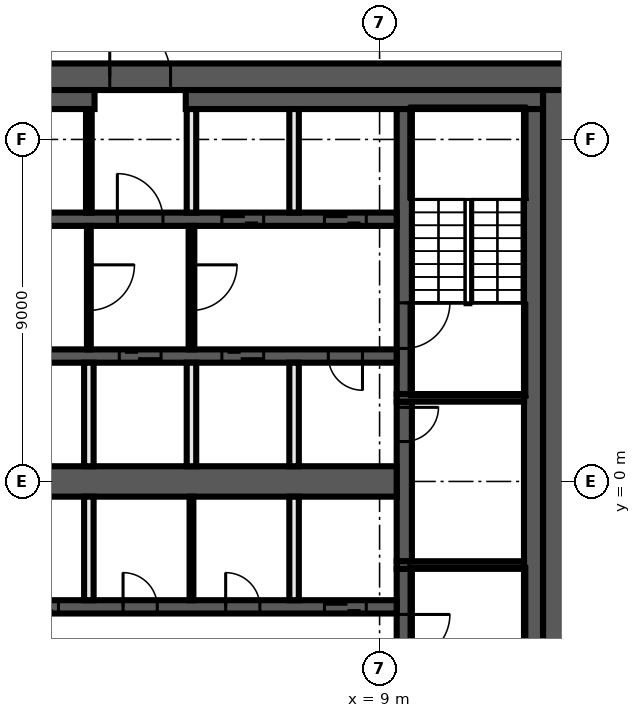
"""IFC4 building model, lengths in metres.
Left out: names, types, materials, properties, quantities, classifications, styles, units other than length and angle.
Written with IfcOpenShell. Run it as: python <this file> out.ifc"""

import sys

from ifc_helpers import new_model, si_unit, direction, frame, frame_2d, origin, place, context, subcontext, project, spatial, rectangle, extrude, element, fill, save


model = new_model("IFC4")
c1 = context("Model", 3, precision=1e-05, world=origin(), true_north=direction((0.0, 1.0)))
c2 = subcontext(c1, "Body", "Model", "MODEL_VIEW")
j1 = project(units=[si_unit("LENGTHUNIT", "METRE"), si_unit("PLANEANGLEUNIT", "RADIAN")], contexts=[c1])
p1 = place(None, origin())
s1 = spatial("IfcSite", under=j1, at=p1, CompositionType="ELEMENT")
p2 = place(p1, origin())
s2 = spatial("IfcBuilding", under=s1, at=p2, CompositionType="ELEMENT")
p3 = place(p2, frame((0.0, 0.0, 283.2)))
s3 = spatial("IfcBuildingStorey", under=s2, at=p3, CompositionType="ELEMENT", Elevation=283.2)
p4 = place(p3, frame((26.921, 9.18, 0.0), z_axis=(0.0, 0.0, 1.0), x_axis=(-0.666670693315, 0.745352390936, 0.0)))
e1 = element("IfcWall", 1, at=p4, inside=s3, PredefinedType="SOLIDWALL", context=c2, shape_type="SweptSolid", body=[
    extrude(rectangle(XDim=20.06, YDim=0.25, at=frame_2d((10.03, 0.0))), origin(), (0.0, 0.0, 1.0), 5.55),
])
p5 = place(p3, frame((-14.0, 10.65, 0.0), z_axis=(0.0, 0.0, 1.0), x_axis=(1.0, 0.0, 0.0)))
e2 = element("IfcWall", 2, at=p5, inside=s3, PredefinedType="SHEAR", context=c2, shape_type="SweptSolid", body=[
    extrude(rectangle(XDim=28.0, YDim=0.7, at=frame_2d((14.0, 0.0))), origin(), (0.0, 0.0, 1.0), 5.55),
])
p6 = place(p5, frame((15.9, 0.0, 0.0)))
e3 = element("IfcOpeningElement", 3, at=p6, cuts=e2, PredefinedType="OPENING", context=c2, shape_type="SweptSolid", body=[
    extrude(rectangle(XDim=1.6, YDim=2.1, at=frame_2d((0.8, 1.05))), frame((0.0, 0.36, 0.0), z_axis=(0.0, -1.0, 0.0), x_axis=(1.0, 0.0, 0.0)), (0.0, 0.0, 1.0), 0.72),
])
p7 = place(p3, frame((13.65, 10.3, 0.0), z_axis=(0.0, 0.0, 1.0), x_axis=(0.0, -1.0, 0.0)))
e4 = element("IfcWall", 4, at=p7, inside=s3, PredefinedType="SHEAR", context=c2, shape_type="SweptSolid", body=[
    extrude(rectangle(XDim=20.6, YDim=0.7, at=frame_2d((10.3, 0.0))), origin(), (0.0, 0.0, 1.0), 5.55),
])
p8 = place(p3, frame((-13.3, 10.05, 0.0), z_axis=(0.0, 0.0, 1.0), x_axis=(1.0, 0.0, 0.0)))
e5 = element("IfcWall", 5, at=p8, inside=s3, PredefinedType="SHEAR", context=c2, shape_type="SweptSolid", body=[
    extrude(rectangle(XDim=14.8, YDim=0.5, at=frame_2d((7.4, 0.0))), origin(), (0.0, 0.0, 1.0), 5.55),
])
p9 = place(p3, frame((3.9, 10.05, 0.0), z_axis=(0.0, 0.0, 1.0), x_axis=(1.0, 0.0, 0.0)))
e6 = element("IfcWall", 6, at=p9, inside=s3, PredefinedType="SHEAR", context=c2, shape_type="SweptSolid", body=[
    extrude(rectangle(XDim=9.4, YDim=0.5, at=frame_2d((4.7, 0.0))), origin(), (0.0, 0.0, 1.0), 5.55),
])
p10 = place(p3, frame((13.05, 9.8, 0.0), z_axis=(0.0, 0.0, 1.0), x_axis=(0.0, -1.0, 0.0)))
e7 = element("IfcWall", 7, at=p10, inside=s3, PredefinedType="SHEAR", context=c2, shape_type="SweptSolid", body=[
    extrude(rectangle(XDim=19.6, YDim=0.5, at=frame_2d((9.8, 0.0))), origin(), (0.0, 0.0, 1.0), 5.55),
])
p11 = place(p3, frame((9.65, -2.3, 0.0), z_axis=(0.0, 0.0, 1.0), x_axis=(0.0, -1.0, 0.0)))
e8 = element("IfcWall", 8, at=p11, inside=s3, PredefinedType="SHEAR", context=c2, shape_type="SweptSolid", body=[
    extrude(rectangle(XDim=7.5, YDim=0.4, at=frame_2d((3.75, 0.0))), origin(), (0.0, 0.0, 1.0), 5.55),
])
p12 = place(p11, frame((1.2, 0.0, 0.0)))
e9 = element("IfcOpeningElement", 9, at=p12, cuts=e8, PredefinedType="OPENING", context=c2, shape_type="SweptSolid", body=[
    extrude(rectangle(XDim=1.2, YDim=2.1, at=frame_2d((0.6, 1.05))), frame((0.0, 0.21, 0.0), z_axis=(0.0, -1.0, 0.0), x_axis=(1.0, 0.0, 0.0)), (0.0, 0.0, 1.0), 0.42),
])
p13 = place(p3, frame((9.65, 2.1, 0.0), z_axis=(0.0, 0.0, 1.0), x_axis=(0.0, -1.0, 0.0)))
e10 = element("IfcWall", 10, at=p13, inside=s3, PredefinedType="SHEAR", context=c2, shape_type="SweptSolid", body=[
    extrude(rectangle(XDim=4.2, YDim=0.4, at=frame_2d((2.1, 0.0))), origin(), (0.0, 0.0, 1.0), 5.55),
])
p14 = place(p13, frame((0.15, 0.0, 0.0)))
e11 = element("IfcOpeningElement", 11, at=p14, cuts=e10, PredefinedType="OPENING", context=c2, shape_type="SweptSolid", body=[
    extrude(rectangle(XDim=0.9, YDim=2.1, at=frame_2d((0.45, 1.05))), frame((0.0, 0.21, 0.0), z_axis=(0.0, -1.0, 0.0), x_axis=(1.0, 0.0, 0.0)), (0.0, 0.0, 1.0), 0.42),
])
p15 = place(p3, frame((9.65, 9.8, 0.0), z_axis=(0.0, 0.0, 1.0), x_axis=(0.0, -1.0, 0.0)))
e12 = element("IfcWall", 12, at=p15, inside=s3, PredefinedType="SHEAR", context=c2, shape_type="SweptSolid", body=[
    extrude(rectangle(XDim=7.5, YDim=0.4, at=frame_2d((3.75, 0.0))), origin(), (0.0, 0.0, 1.0), 5.55),
])
p16 = place(p15, frame((5.1, 0.0, 0.0)))
e13 = element("IfcOpeningElement", 13, at=p16, cuts=e12, PredefinedType="OPENING", context=c2, shape_type="SweptSolid", body=[
    extrude(rectangle(XDim=1.2, YDim=2.1, at=frame_2d((0.6, 1.05))), frame((0.0, 0.21, 0.0), z_axis=(0.0, -1.0, 0.0), x_axis=(1.0, 0.0, 0.0)), (0.0, 0.0, 1.0), 0.42),
])
for number, where, z_axis, x_axis in (
    (14, (9.45, 2.2, 0.0), (0.0, 0.0, 1.0), (1.0, 0.0, 0.0)),
    (15, (9.45, -2.2, 0.0), (0.0, 0.0, 1.0), (1.0, 0.0, 0.0)),
):
    element("IfcWall", number, at=place(p3, frame(where, z_axis=z_axis, x_axis=x_axis)), inside=s3, PredefinedType="SHEAR", context=c2, shape_type="SweptSolid", body=[
        extrude(rectangle(XDim=3.35, YDim=0.2, at=frame_2d((1.675, 0.0))), origin(), (0.0, 0.0, 1.0), 5.55),
    ])
p17 = place(p3, frame((-9.45, 6.9, 0.0), z_axis=(0.0, 0.0, 1.0), x_axis=(1.0, 0.0, 0.0)))
e16 = element("IfcWall", 16, at=p17, inside=s3, PredefinedType="SHEAR", context=c2, shape_type="SweptSolid", body=[
    extrude(rectangle(XDim=18.9, YDim=0.35, at=frame_2d((9.45, 0.0))), origin(), (0.0, 0.0, 1.0), 5.55),
])
p18 = place(p17, frame((11.55, 0.0, 0.0)))
e17 = element("IfcOpeningElement", 17, at=p18, cuts=e16, PredefinedType="OPENING", context=c2, shape_type="SweptSolid", body=[
    extrude(rectangle(XDim=1.2, YDim=2.1, at=frame_2d((0.6, 1.05))), frame((0.0, 0.185, 0.0), z_axis=(0.0, -1.0, 0.0), x_axis=(1.0, 0.0, 0.0)), (0.0, 0.0, 1.0), 0.37),
])
p19 = place(p17, frame((14.3, 0.0, 0.0)))
e18 = element("IfcOpeningElement", 18, at=p19, cuts=e16, PredefinedType="OPENING", context=c2, shape_type="SweptSolid", body=[
    extrude(rectangle(XDim=1.1, YDim=2.1, at=frame_2d((0.55, 1.05))), frame((0.0, 0.185, 0.0), z_axis=(0.0, -1.0, 0.0), x_axis=(1.0, 0.0, 0.0)), (0.0, 0.0, 1.0), 0.37),
])
p20 = place(p17, frame((17.0, 0.0, 0.0)))
e19 = element("IfcOpeningElement", 19, at=p20, cuts=e16, PredefinedType="OPENING", context=c2, shape_type="SweptSolid", body=[
    extrude(rectangle(XDim=1.1, YDim=2.1, at=frame_2d((0.55, 1.05))), frame((0.0, 0.185, 0.0), z_axis=(0.0, -1.0, 0.0), x_axis=(1.0, 0.0, 0.0)), (0.0, 0.0, 1.0), 0.37),
])
p21 = place(p17, frame((2.25, 0.0, 0.0)))
e20 = element("IfcOpeningElement", 20, at=p21, cuts=e16, PredefinedType="OPENING", context=c2, shape_type="SweptSolid", body=[
    extrude(rectangle(XDim=0.9, YDim=2.1, at=frame_2d((0.45, 1.05))), frame((0.0, 0.185, 0.0), z_axis=(0.0, -1.0, 0.0), x_axis=(1.0, 0.0, 0.0)), (0.0, 0.0, 1.0), 0.37),
])
p22 = place(p17, frame((7.65, 0.0, 0.0)))
e21 = element("IfcOpeningElement", 21, at=p22, cuts=e16, PredefinedType="OPENING", context=c2, shape_type="SweptSolid", body=[
    extrude(rectangle(XDim=0.9, YDim=2.1, at=frame_2d((0.45, 1.05))), frame((0.0, 0.185, 0.0), z_axis=(0.0, -1.0, 0.0), x_axis=(1.0, 0.0, 0.0)), (0.0, 0.0, 1.0), 0.37),
])
p23 = place(p3, frame((9.45, 3.3, 0.0), z_axis=(0.0, 0.0, 1.0), x_axis=(-1.0, 0.0, 0.0)))
e22 = element("IfcWall", 22, at=p23, inside=s3, PredefinedType="SHEAR", context=c2, shape_type="SweptSolid", body=[
    extrude(rectangle(XDim=18.9, YDim=0.35, at=frame_2d((9.45, 0.0))), origin(), (0.0, 0.0, 1.0), 5.55),
])
p24 = place(p23, frame((6.2, 0.0, 0.0)))
e23 = element("IfcOpeningElement", 23, at=p24, cuts=e22, PredefinedType="OPENING", context=c2, shape_type="SweptSolid", body=[
    extrude(rectangle(XDim=1.1, YDim=2.1, at=frame_2d((0.55, 1.05))), frame((0.0, 0.185, 0.0), z_axis=(0.0, -1.0, 0.0), x_axis=(1.0, 0.0, 0.0)), (0.0, 0.0, 1.0), 0.37),
])
p25 = place(p23, frame((3.5, 0.0, 0.0)))
e24 = element("IfcOpeningElement", 24, at=p25, cuts=e22, PredefinedType="OPENING", context=c2, shape_type="SweptSolid", body=[
    extrude(rectangle(XDim=1.1, YDim=2.1, at=frame_2d((0.55, 1.05))), frame((0.0, 0.185, 0.0), z_axis=(0.0, -1.0, 0.0), x_axis=(1.0, 0.0, 0.0)), (0.0, 0.0, 1.0), 0.37),
])
p26 = place(p23, frame((0.9, 0.0, 0.0)))
e25 = element("IfcOpeningElement", 25, at=p26, cuts=e22, PredefinedType="OPENING", context=c2, shape_type="SweptSolid", body=[
    extrude(rectangle(XDim=0.9, YDim=2.1, at=frame_2d((0.45, 1.05))), frame((0.0, 0.185, 0.0), z_axis=(0.0, -1.0, 0.0), x_axis=(1.0, 0.0, 0.0)), (0.0, 0.0, 1.0), 0.37),
])
p27 = place(p23, frame((17.1, 0.0, 0.0)))
e26 = element("IfcOpeningElement", 26, at=p27, cuts=e22, PredefinedType="OPENING", context=c2, shape_type="SweptSolid", body=[
    extrude(rectangle(XDim=0.9, YDim=2.1, at=frame_2d((0.45, 1.05))), frame((0.0, 0.185, 0.0), z_axis=(0.0, -1.0, 0.0), x_axis=(1.0, 0.0, 0.0)), (0.0, 0.0, 1.0), 0.37),
])
p28 = place(p23, frame((11.7, 0.0, 0.0)))
e27 = element("IfcOpeningElement", 27, at=p28, cuts=e22, PredefinedType="OPENING", context=c2, shape_type="SweptSolid", body=[
    extrude(rectangle(XDim=0.9, YDim=2.1, at=frame_2d((0.45, 1.05))), frame((0.0, 0.185, 0.0), z_axis=(0.0, -1.0, 0.0), x_axis=(1.0, 0.0, 0.0)), (0.0, 0.0, 1.0), 0.37),
])
p29 = place(p3, frame((-9.45, -3.3, 0.0), z_axis=(0.0, 0.0, 1.0), x_axis=(1.0, 0.0, 0.0)))
e28 = element("IfcWall", 28, at=p29, inside=s3, PredefinedType="SHEAR", context=c2, shape_type="SweptSolid", body=[
    extrude(rectangle(XDim=18.9, YDim=0.35, at=frame_2d((9.45, 0.0))), origin(), (0.0, 0.0, 1.0), 5.55),
])
p30 = place(p29, frame((0.8, 0.0, 0.0)))
e29 = element("IfcOpeningElement", 29, at=p30, cuts=e28, PredefinedType="OPENING", context=c2, shape_type="SweptSolid", body=[
    extrude(rectangle(XDim=1.1, YDim=2.1, at=frame_2d((0.55, 1.05))), frame((0.0, 0.185, 0.0), z_axis=(0.0, -1.0, 0.0), x_axis=(1.0, 0.0, 0.0)), (0.0, 0.0, 1.0), 0.37),
])
p31 = place(p29, frame((3.5, 0.0, 0.0)))
e30 = element("IfcOpeningElement", 30, at=p31, cuts=e28, PredefinedType="OPENING", context=c2, shape_type="SweptSolid", body=[
    extrude(rectangle(XDim=1.1, YDim=2.1, at=frame_2d((0.55, 1.05))), frame((0.0, 0.185, 0.0), z_axis=(0.0, -1.0, 0.0), x_axis=(1.0, 0.0, 0.0)), (0.0, 0.0, 1.0), 0.37),
])
p32 = place(p29, frame((6.2, 0.0, 0.0)))
e31 = element("IfcOpeningElement", 31, at=p32, cuts=e28, PredefinedType="OPENING", context=c2, shape_type="SweptSolid", body=[
    extrude(rectangle(XDim=1.1, YDim=2.1, at=frame_2d((0.55, 1.05))), frame((0.0, 0.185, 0.0), z_axis=(0.0, -1.0, 0.0), x_axis=(1.0, 0.0, 0.0)), (0.0, 0.0, 1.0), 0.37),
])
p33 = place(p29, frame((8.9, 0.0, 0.0)))
e32 = element("IfcOpeningElement", 32, at=p33, cuts=e28, PredefinedType="OPENING", context=c2, shape_type="SweptSolid", body=[
    extrude(rectangle(XDim=1.1, YDim=2.1, at=frame_2d((0.55, 1.05))), frame((0.0, 0.185, 0.0), z_axis=(0.0, -1.0, 0.0), x_axis=(1.0, 0.0, 0.0)), (0.0, 0.0, 1.0), 0.37),
])
p34 = place(p29, frame((17.0, 0.0, 0.0)))
e33 = element("IfcOpeningElement", 33, at=p34, cuts=e28, PredefinedType="OPENING", context=c2, shape_type="SweptSolid", body=[
    extrude(rectangle(XDim=1.1, YDim=2.1, at=frame_2d((0.55, 1.05))), frame((0.0, 0.185, 0.0), z_axis=(0.0, -1.0, 0.0), x_axis=(1.0, 0.0, 0.0)), (0.0, 0.0, 1.0), 0.37),
])
p35 = place(p29, frame((11.7, 0.0, 0.0)))
e34 = element("IfcOpeningElement", 34, at=p35, cuts=e28, PredefinedType="OPENING", context=c2, shape_type="SweptSolid", body=[
    extrude(rectangle(XDim=0.9, YDim=2.1, at=frame_2d((0.45, 1.05))), frame((0.0, 0.185, 0.0), z_axis=(0.0, -1.0, 0.0), x_axis=(1.0, 0.0, 0.0)), (0.0, 0.0, 1.0), 0.37),
])
p36 = place(p29, frame((14.4, 0.0, 0.0)))
e35 = element("IfcOpeningElement", 35, at=p36, cuts=e28, PredefinedType="OPENING", context=c2, shape_type="SweptSolid", body=[
    extrude(rectangle(XDim=0.9, YDim=2.1, at=frame_2d((0.45, 1.05))), frame((0.0, 0.185, 0.0), z_axis=(0.0, -1.0, 0.0), x_axis=(1.0, 0.0, 0.0)), (0.0, 0.0, 1.0), 0.37),
])
p37 = place(p3, frame((-9.45, 0.0, 0.0), z_axis=(0.0, 0.0, 1.0), x_axis=(1.0, 0.0, 0.0)))
e36 = element("IfcWall", 36, at=p37, inside=s3, PredefinedType="SHEAR", context=c2, shape_type="SweptSolid", body=[
    extrude(rectangle(XDim=18.9, YDim=0.8, at=frame_2d((9.45, 0.0))), origin(), (0.0, 0.0, 1.0), 5.55),
])
for number, where, z_axis, x_axis in (
    (37, (6.75, -3.125, 0.0), (0.0, 0.0, 1.0), (0.0, 1.0, 0.0)),
    (38, (6.75, 0.4, 0.0), (0.0, 0.0, 1.0), (0.0, 1.0, 0.0)),
    (39, (6.75, 7.075, 0.0), (0.0, 0.0, 1.0), (0.0, 1.0, 0.0)),
):
    element("IfcWall", number, at=place(p3, frame(where, z_axis=z_axis, x_axis=x_axis)), inside=s3, PredefinedType="SOLIDWALL", context=c2, shape_type="SweptSolid", body=[
        extrude(rectangle(XDim=2.725, YDim=0.25, at=frame_2d((1.363, 0.0))), origin(), (0.0, 0.0, 1.0), 5.55),
    ])
p38 = place(p3, frame((4.05, 6.725, 0.0), z_axis=(0.0, 0.0, 1.0), x_axis=(0.0, -1.0, 0.0)))
e40 = element("IfcWall", 40, at=p38, inside=s3, PredefinedType="PARTITIONING", context=c2, shape_type="SweptSolid", body=[
    extrude(rectangle(XDim=3.25, YDim=0.15, at=frame_2d((1.625, 0.0))), origin(), (0.0, 0.0, 1.0), 5.55),
])
p39 = place(p38, frame((1.025, 0.0, 0.0)))
e41 = element("IfcOpeningElement", 41, at=p39, cuts=e40, PredefinedType="OPENING", context=c2, shape_type="SweptSolid", body=[
    extrude(rectangle(XDim=1.2, YDim=2.1, at=frame_2d((0.6, 1.05))), frame((0.0, 0.085, 0.0), z_axis=(0.0, -1.0, 0.0), x_axis=(1.0, 0.0, 0.0)), (0.0, 0.0, 1.0), 0.17),
])
p40 = place(p3, frame((4.05, -3.125, 0.0), z_axis=(0.0, 0.0, 1.0), x_axis=(0.0, 1.0, 0.0)))
e42 = element("IfcWall", 42, at=p40, inside=s3, PredefinedType="PARTITIONING", context=c2, shape_type="SweptSolid", body=[
    extrude(rectangle(XDim=2.725, YDim=0.1, at=frame_2d((1.363, 0.0))), origin(), (0.0, 0.0, 1.0), 5.55),
])
for number, where, z_axis, x_axis in (
    (43, (4.05, 0.4, 0.0), (0.0, 0.0, 1.0), (0.0, 1.0, 0.0)),
    (44, (4.05, 7.075, 0.0), (0.0, 0.0, 1.0), (0.0, 1.0, 0.0)),
):
    element("IfcWall", number, at=place(p3, frame(where, z_axis=z_axis, x_axis=x_axis)), inside=s3, PredefinedType="SOLIDWALL", context=c2, shape_type="SweptSolid", body=[
        extrude(rectangle(XDim=2.725, YDim=0.25, at=frame_2d((1.363, 0.0))), origin(), (0.0, 0.0, 1.0), 5.55),
    ])
p41 = place(p3, frame((1.35, 7.075, 0.0), z_axis=(0.0, 0.0, 1.0), x_axis=(0.0, 1.0, 0.0)))
e45 = element("IfcWall", 45, at=p41, inside=s3, PredefinedType="PARTITIONING", context=c2, shape_type="SweptSolid", body=[
    extrude(rectangle(XDim=2.725, YDim=0.15, at=frame_2d((1.363, 0.0))), origin(), (0.0, 0.0, 1.0), 5.55),
])
p42 = place(p3, frame((1.35, 6.725, 0.0), z_axis=(0.0, 0.0, 1.0), x_axis=(0.0, -1.0, 0.0)))
e46 = element("IfcWall", 46, at=p42, inside=s3, PredefinedType="PARTITIONING", context=c2, shape_type="SweptSolid", body=[
    extrude(rectangle(XDim=3.25, YDim=0.1, at=frame_2d((1.625, 0.0))), origin(), (0.0, 0.0, 1.0), 5.55),
])
p43 = place(p42, frame((1.025, 0.0, 0.0)))
e47 = element("IfcOpeningElement", 47, at=p43, cuts=e46, PredefinedType="OPENING", context=c2, shape_type="SweptSolid", body=[
    extrude(rectangle(XDim=1.2, YDim=2.1, at=frame_2d((0.6, 1.05))), frame((0.0, 0.06, 0.0), z_axis=(0.0, -1.0, 0.0), x_axis=(1.0, 0.0, 0.0)), (0.0, 0.0, 1.0), 0.12),
])
for number, where, z_axis, x_axis in (
    (48, (1.35, -3.125, 0.0), (0.0, 0.0, 1.0), (0.0, 1.0, 0.0)),
    (49, (1.35, 0.4, 0.0), (0.0, 0.0, 1.0), (0.0, 1.0, 0.0)),
):
    element("IfcWall", number, at=place(p3, frame(where, z_axis=z_axis, x_axis=x_axis)), inside=s3, PredefinedType="SOLIDWALL", context=c2, shape_type="SweptSolid", body=[
        extrude(rectangle(XDim=2.725, YDim=0.25, at=frame_2d((1.363, 0.0))), origin(), (0.0, 0.0, 1.0), 5.55),
    ])
p44 = place(p14, origin())
e50 = element("IfcDoor", 50, at=p44, inside=s3, OperationType="SINGLE_SWING_RIGHT", PredefinedType="DOOR", context=c2, shape_type="SweptSolid", body=[
    extrude(rectangle(XDim=0.9, YDim=2.1, at=frame_2d((0.45, 1.05))), frame((0.0, 0.025, 0.0), z_axis=(0.0, -1.0, 0.0), x_axis=(1.0, 0.0, 0.0)), (0.0, 0.0, 1.0), 0.05),
])
fill(e11, e50)
p45 = place(p6, origin())
e51 = element("IfcDoor", 51, at=p45, inside=s3, OperationType="DOUBLE_DOOR_SINGLE_SWING", PredefinedType="DOOR", context=c2, shape_type="SweptSolid", body=[
    extrude(rectangle(XDim=1.6, YDim=2.1, at=frame_2d((0.8, 1.05))), frame((0.0, 0.025, 0.0), z_axis=(0.0, -1.0, 0.0), x_axis=(1.0, 0.0, 0.0)), (0.0, 0.0, 1.0), 0.05),
])
fill(e3, e51)
p46 = place(p18, origin())
e52 = element("IfcDoor", 52, at=p46, inside=s3, OperationType="SINGLE_SWING_LEFT", PredefinedType="DOOR", context=c2, shape_type="SweptSolid", body=[
    extrude(rectangle(XDim=1.2, YDim=2.1, at=frame_2d((0.6, 1.05))), frame((0.0, 0.025, 0.0), z_axis=(0.0, -1.0, 0.0), x_axis=(1.0, 0.0, 0.0)), (0.0, 0.0, 1.0), 0.05),
])
fill(e17, e52)
p47 = place(p19, origin())
e53 = element("IfcDoor", 53, at=p47, inside=s3, OperationType="DOUBLE_DOOR_SLIDING", PredefinedType="DOOR", context=c2, shape_type="SweptSolid", body=[
    extrude(rectangle(XDim=1.1, YDim=2.1, at=frame_2d((0.55, 1.05))), frame((0.0, 0.025, 0.0), z_axis=(0.0, -1.0, 0.0), x_axis=(1.0, 0.0, 0.0)), (0.0, 0.0, 1.0), 0.05),
])
fill(e18, e53)
p48 = place(p20, origin())
e54 = element("IfcDoor", 54, at=p48, inside=s3, OperationType="DOUBLE_DOOR_SLIDING", PredefinedType="DOOR", context=c2, shape_type="SweptSolid", body=[
    extrude(rectangle(XDim=1.1, YDim=2.1, at=frame_2d((0.55, 1.05))), frame((0.0, 0.025, 0.0), z_axis=(0.0, -1.0, 0.0), x_axis=(1.0, 0.0, 0.0)), (0.0, 0.0, 1.0), 0.05),
])
fill(e19, e54)
p49 = place(p24, origin())
e55 = element("IfcDoor", 55, at=p49, inside=s3, OperationType="DOUBLE_DOOR_SLIDING", PredefinedType="DOOR", context=c2, shape_type="SweptSolid", body=[
    extrude(rectangle(XDim=1.1, YDim=2.1, at=frame_2d((0.55, 1.05))), frame((0.0, 0.025, 0.0), z_axis=(0.0, -1.0, 0.0), x_axis=(1.0, 0.0, 0.0)), (0.0, 0.0, 1.0), 0.05),
])
fill(e23, e55)
p50 = place(p25, origin())
e56 = element("IfcDoor", 56, at=p50, inside=s3, OperationType="DOUBLE_DOOR_SLIDING", PredefinedType="DOOR", context=c2, shape_type="SweptSolid", body=[
    extrude(rectangle(XDim=1.1, YDim=2.1, at=frame_2d((0.55, 1.05))), frame((0.0, 0.025, 0.0), z_axis=(0.0, -1.0, 0.0), x_axis=(1.0, 0.0, 0.0)), (0.0, 0.0, 1.0), 0.05),
])
fill(e24, e56)
p51 = place(p26, origin())
e57 = element("IfcDoor", 57, at=p51, inside=s3, OperationType="SINGLE_SWING_LEFT", PredefinedType="DOOR", context=c2, shape_type="SweptSolid", body=[
    extrude(rectangle(XDim=0.9, YDim=2.1, at=frame_2d((0.45, 1.05))), frame((0.0, 0.025, 0.0), z_axis=(0.0, -1.0, 0.0), x_axis=(1.0, 0.0, 0.0)), (0.0, 0.0, 1.0), 0.05),
])
fill(e25, e57)
p52 = place(p33, origin())
e58 = element("IfcDoor", 58, at=p52, inside=s3, OperationType="DOUBLE_DOOR_SLIDING", PredefinedType="DOOR", context=c2, shape_type="SweptSolid", body=[
    extrude(rectangle(XDim=1.1, YDim=2.1, at=frame_2d((0.55, 1.05))), frame((0.0, 0.025, 0.0), z_axis=(0.0, -1.0, 0.0), x_axis=(1.0, 0.0, 0.0)), (0.0, 0.0, 1.0), 0.05),
])
fill(e32, e58)
p53 = place(p34, origin())
e59 = element("IfcDoor", 59, at=p53, inside=s3, OperationType="DOUBLE_DOOR_SLIDING", PredefinedType="DOOR", context=c2, shape_type="SweptSolid", body=[
    extrude(rectangle(XDim=1.1, YDim=2.1, at=frame_2d((0.55, 1.05))), frame((0.0, 0.025, 0.0), z_axis=(0.0, -1.0, 0.0), x_axis=(1.0, 0.0, 0.0)), (0.0, 0.0, 1.0), 0.05),
])
fill(e33, e59)
p54 = place(p35, origin())
e60 = element("IfcDoor", 60, at=p54, inside=s3, OperationType="SINGLE_SWING_RIGHT", PredefinedType="DOOR", context=c2, shape_type="SweptSolid", body=[
    extrude(rectangle(XDim=0.9, YDim=2.1, at=frame_2d((0.45, 1.05))), frame((0.0, 0.025, 0.0), z_axis=(0.0, -1.0, 0.0), x_axis=(1.0, 0.0, 0.0)), (0.0, 0.0, 1.0), 0.05),
])
fill(e34, e60)
p55 = place(p36, origin())
e61 = element("IfcDoor", 61, at=p55, inside=s3, OperationType="SINGLE_SWING_LEFT", PredefinedType="DOOR", context=c2, shape_type="SweptSolid", body=[
    extrude(rectangle(XDim=0.9, YDim=2.1, at=frame_2d((0.45, 1.05))), frame((0.0, 0.025, 0.0), z_axis=(0.0, -1.0, 0.0), x_axis=(1.0, 0.0, 0.0)), (0.0, 0.0, 1.0), 0.05),
])
fill(e35, e61)
p56 = place(p16, origin())
e62 = element("IfcDoor", 62, at=p56, inside=s3, OperationType="SINGLE_SWING_LEFT", PredefinedType="DOOR", context=c2, shape_type="SweptSolid", body=[
    extrude(rectangle(XDim=1.2, YDim=2.1, at=frame_2d((0.6, 1.05))), frame((0.0, 0.025, 0.0), z_axis=(0.0, -1.0, 0.0), x_axis=(1.0, 0.0, 0.0)), (0.0, 0.0, 1.0), 0.05),
])
fill(e13, e62)
p57 = place(p12, origin())
e63 = element("IfcDoor", 63, at=p57, inside=s3, OperationType="SINGLE_SWING_RIGHT", PredefinedType="DOOR", context=c2, shape_type="SweptSolid", body=[
    extrude(rectangle(XDim=1.2, YDim=2.1, at=frame_2d((0.6, 1.05))), frame((0.0, 0.025, 0.0), z_axis=(0.0, -1.0, 0.0), x_axis=(1.0, 0.0, 0.0)), (0.0, 0.0, 1.0), 0.05),
])
fill(e9, e63)
p58 = place(p43, origin())
e64 = element("IfcDoor", 64, at=p58, inside=s3, OperationType="SINGLE_SWING_LEFT", PredefinedType="DOOR", context=c2, shape_type="SweptSolid", body=[
    extrude(rectangle(XDim=1.2, YDim=2.1, at=frame_2d((0.6, 1.05))), frame((0.0, 0.025, 0.0), z_axis=(0.0, -1.0, 0.0), x_axis=(1.0, 0.0, 0.0)), (0.0, 0.0, 1.0), 0.05),
])
fill(e47, e64)
p59 = place(p39, origin())
e65 = element("IfcDoor", 65, at=p59, inside=s3, OperationType="SINGLE_SWING_RIGHT", PredefinedType="DOOR", context=c2, shape_type="SweptSolid", body=[
    extrude(rectangle(XDim=1.2, YDim=2.1, at=frame_2d((0.6, 1.05))), frame((0.0, 0.025, 0.0), z_axis=(0.0, -1.0, 0.0), x_axis=(1.0, 0.0, 0.0)), (0.0, 0.0, 1.0), 0.05),
])
fill(e41, e65)
save(model, sys.argv[1])
